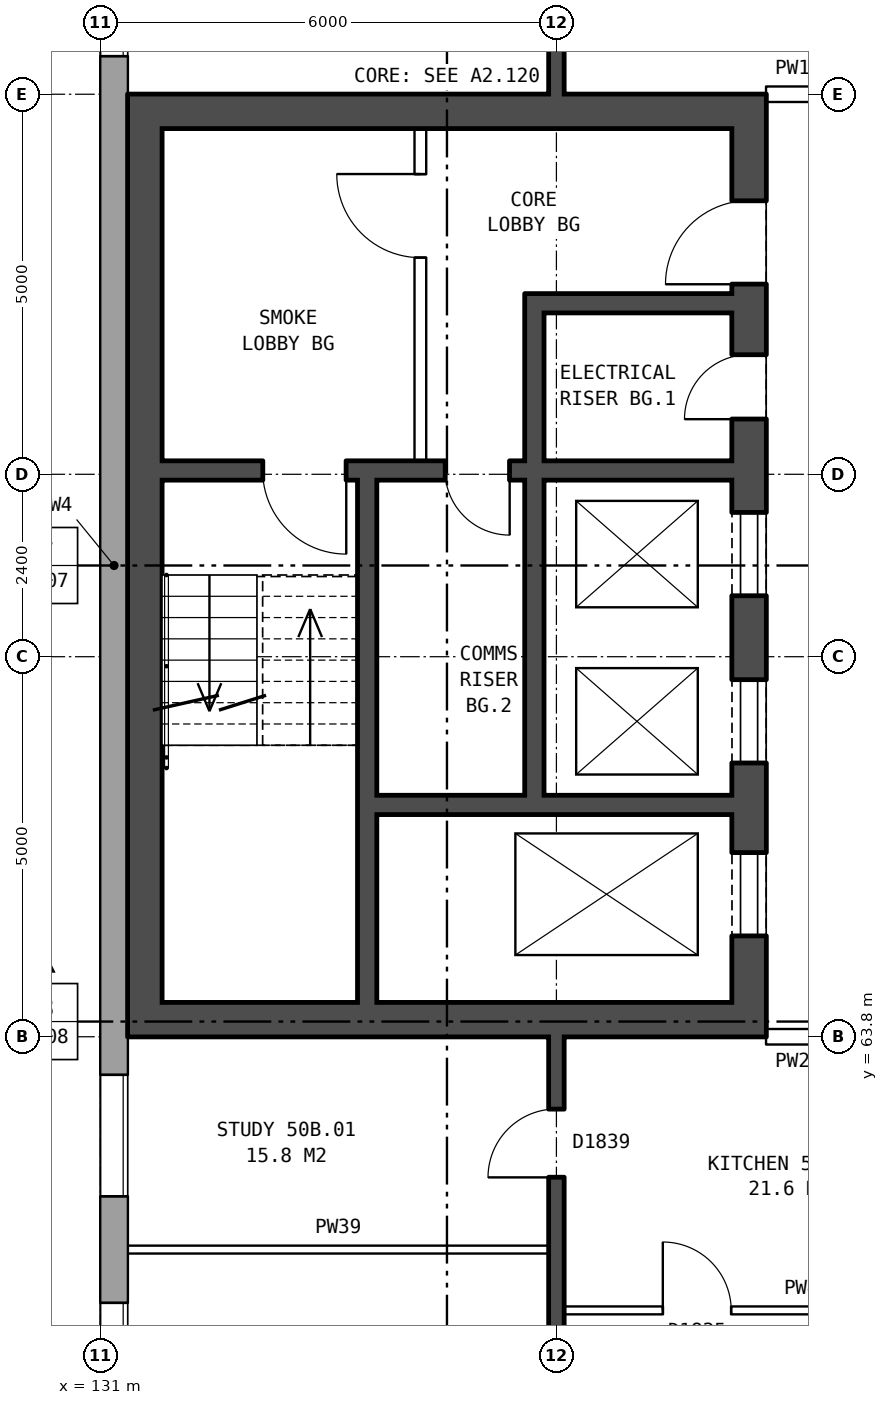
"""IFC4 building model, lengths in metres.
Left out: names, types, materials, properties, quantities, classifications, styles, units other than length and angle.
Written with IfcOpenShell. Run it as: python <this file> out.ifc"""

import sys

from ifc_helpers import new_model, si_unit, direction, frame, frame_2d, origin, place, context, subcontext, project, spatial, rectangle, extrude, element, fill, save


model = new_model("IFC4")
c1 = context("Model", 3, precision=1e-05, world=origin(), true_north=direction((0.0, 1.0)))
c2 = subcontext(c1, "Body", "Model", "MODEL_VIEW")
j1 = project(units=[si_unit("LENGTHUNIT", "METRE"), si_unit("PLANEANGLEUNIT", "RADIAN")], contexts=[c1])
p1 = place(None, origin())
s1 = spatial("IfcSite", under=j1, at=p1, CompositionType="ELEMENT")
p2 = place(p1, origin())
s2 = spatial("IfcBuilding", under=s1, at=p2, CompositionType="ELEMENT")
p3 = place(p2, frame((0.0, 0.0, 178.9)))
s3 = spatial("IfcBuildingStorey", under=s2, at=p3, CompositionType="ELEMENT", Elevation=178.9)
p4 = place(p3, frame((131.18, 82.925, 0.0), z_axis=(0.0, 0.0, 1.0), x_axis=(0.0, -1.0, 0.0)))
e1 = element("IfcWall", 1, at=p4, inside=s3, PredefinedType="STANDARD", context=c2, shape_type="SweptSolid", body=[
    extrude(rectangle(XDim=25.851, YDim=0.36, at=frame_2d((12.925, 0.0))), origin(), (0.0, 0.0, 1.0), 2.85),
])
p5 = place(p4, frame((1.625, 0.0, 0.8)))
e2 = element("IfcOpeningElement", 2, at=p5, cuts=e1, PredefinedType="OPENING", context=c2, shape_type="SweptSolid", body=[
    extrude(rectangle(XDim=1.6, YDim=1.8, at=frame_2d((0.8, 0.9))), frame((0.0, 0.19, 0.0), z_axis=(0.0, -1.0, 0.0), x_axis=(1.0, 0.0, 0.0)), (0.0, 0.0, 1.0), 0.38),
])
p6 = place(p4, frame((4.625, 0.0, 0.8)))
e3 = element("IfcOpeningElement", 3, at=p6, cuts=e1, PredefinedType="OPENING", context=c2, shape_type="SweptSolid", body=[
    extrude(rectangle(XDim=1.6, YDim=1.8, at=frame_2d((0.8, 0.9))), frame((0.0, 0.19, 0.0), z_axis=(0.0, -1.0, 0.0), x_axis=(1.0, 0.0, 0.0)), (0.0, 0.0, 1.0), 0.38),
])
p7 = place(p4, frame((19.625, 0.0, 0.8)))
e4 = element("IfcOpeningElement", 4, at=p7, cuts=e1, PredefinedType="OPENING", context=c2, shape_type="SweptSolid", body=[
    extrude(rectangle(XDim=1.6, YDim=1.8, at=frame_2d((0.8, 0.9))), frame((0.0, 0.19, 0.0), z_axis=(0.0, -1.0, 0.0), x_axis=(1.0, 0.0, 0.0)), (0.0, 0.0, 1.0), 0.38),
])
p8 = place(p4, frame((22.625, 0.0, 0.8)))
e5 = element("IfcOpeningElement", 5, at=p8, cuts=e1, PredefinedType="OPENING", context=c2, shape_type="SweptSolid", body=[
    extrude(rectangle(XDim=1.6, YDim=1.8, at=frame_2d((0.8, 0.9))), frame((0.0, 0.19, 0.0), z_axis=(0.0, -1.0, 0.0), x_axis=(1.0, 0.0, 0.0)), (0.0, 0.0, 1.0), 0.38),
])
p9 = place(p3, frame((139.535, 63.8, 0.0), z_axis=(0.0, 0.0, 1.0), x_axis=(0.0, 1.0, 0.0)))
e6 = element("IfcWall", 6, at=p9, inside=s3, PredefinedType="SHEAR", context=c2, shape_type="SweptSolid", body=[
    extrude(rectangle(XDim=12.4, YDim=0.45, at=frame_2d((6.2, 0.0))), origin(), (0.0, 0.0, 1.0), 2.85),
])
p10 = place(p9, frame((1.325, 0.0, 0.0)))
e7 = element("IfcOpeningElement", 7, at=p10, cuts=e6, PredefinedType="OPENING", context=c2, shape_type="SweptSolid", body=[
    extrude(rectangle(XDim=1.1, YDim=2.1, at=frame_2d((0.55, 1.05))), frame((0.0, 0.235, 0.0), z_axis=(0.0, -1.0, 0.0), x_axis=(1.0, 0.0, 0.0)), (0.0, 0.0, 1.0), 0.47),
])
p11 = place(p9, frame((3.6, 0.0, 0.0)))
e8 = element("IfcOpeningElement", 8, at=p11, cuts=e6, PredefinedType="OPENING", context=c2, shape_type="SweptSolid", body=[
    extrude(rectangle(XDim=1.1, YDim=2.1, at=frame_2d((0.55, 1.05))), frame((0.0, 0.235, 0.0), z_axis=(0.0, -1.0, 0.0), x_axis=(1.0, 0.0, 0.0)), (0.0, 0.0, 1.0), 0.47),
])
p12 = place(p9, frame((5.8, 0.0, 0.0)))
e9 = element("IfcOpeningElement", 9, at=p12, cuts=e6, PredefinedType="OPENING", context=c2, shape_type="SweptSolid", body=[
    extrude(rectangle(XDim=1.1, YDim=2.1, at=frame_2d((0.55, 1.05))), frame((0.0, 0.235, 0.0), z_axis=(0.0, -1.0, 0.0), x_axis=(1.0, 0.0, 0.0)), (0.0, 0.0, 1.0), 0.47),
])
p13 = place(p9, frame((9.9, 0.0, 0.0)))
e10 = element("IfcOpeningElement", 10, at=p13, cuts=e6, PredefinedType="OPENING", context=c2, shape_type="SweptSolid", body=[
    extrude(rectangle(XDim=1.1, YDim=2.1, at=frame_2d((0.55, 1.05))), frame((0.0, 0.235, 0.0), z_axis=(0.0, -1.0, 0.0), x_axis=(1.0, 0.0, 0.0)), (0.0, 0.0, 1.0), 0.47),
])
p14 = place(p9, frame((8.125, 0.0, 0.0)))
e11 = element("IfcOpeningElement", 11, at=p14, cuts=e6, PredefinedType="OPENING", context=c2, shape_type="SweptSolid", body=[
    extrude(rectangle(XDim=0.85, YDim=2.1, at=frame_2d((0.425, 1.05))), frame((0.0, 0.235, 0.0), z_axis=(0.0, -1.0, 0.0), x_axis=(1.0, 0.0, 0.0)), (0.0, 0.0, 1.0), 0.47),
])
p15 = place(p3, frame((131.585, 63.8, 0.0), z_axis=(0.0, 0.0, 1.0), x_axis=(0.0, 1.0, 0.0)))
e12 = element("IfcWall", 12, at=p15, inside=s3, PredefinedType="SHEAR", context=c2, shape_type="SweptSolid", body=[
    extrude(rectangle(XDim=12.4, YDim=0.45, at=frame_2d((6.2, 0.0))), origin(), (0.0, 0.0, 1.0), 2.85),
])
for number, where, z_axis, x_axis in (
    (13, (139.31, 64.025, 0.0), (0.0, 0.0, 1.0), (-1.0, 0.0, 0.0)),
    (14, (139.31, 75.975, 0.0), (0.0, 0.0, 1.0), (-1.0, 0.0, 0.0)),
):
    element("IfcWall", number, at=place(p3, frame(where, z_axis=z_axis, x_axis=x_axis)), inside=s3, PredefinedType="SHEAR", context=c2, shape_type="SweptSolid", body=[
        extrude(rectangle(XDim=7.5, YDim=0.45, at=frame_2d((3.75, 0.0))), origin(), (0.0, 0.0, 1.0), 2.85),
    ])
p16 = place(p3, frame((139.31, 66.85, 0.0), z_axis=(0.0, 0.0, 1.0), x_axis=(-1.0, 0.0, 0.0)))
e15 = element("IfcWall", 15, at=p16, inside=s3, PredefinedType="SHEAR", context=c2, shape_type="SweptSolid", body=[
    extrude(rectangle(XDim=4.675, YDim=0.25, at=frame_2d((2.337, 0.0))), origin(), (0.0, 0.0, 1.0), 2.85),
])
p17 = place(p3, frame((139.31, 71.25, 0.0), z_axis=(0.0, 0.0, 1.0), x_axis=(-1.0, 0.0, 0.0)))
e16 = element("IfcWall", 16, at=p17, inside=s3, PredefinedType="SHEAR", context=c2, shape_type="SweptSolid", body=[
    extrude(rectangle(XDim=7.5, YDim=0.25, at=frame_2d((3.75, 0.0))), origin(), (0.0, 0.0, 1.0), 2.85),
])
p18 = place(p17, frame((5.075, 0.0, 0.0)))
e17 = element("IfcOpeningElement", 17, at=p18, cuts=e16, PredefinedType="OPENING", context=c2, shape_type="SweptSolid", body=[
    extrude(rectangle(XDim=1.1, YDim=2.1, at=frame_2d((0.55, 1.05))), frame((0.0, 0.135, 0.0), z_axis=(0.0, -1.0, 0.0), x_axis=(1.0, 0.0, 0.0)), (0.0, 0.0, 1.0), 0.27),
])
p19 = place(p17, frame((2.925, 0.0, 0.0)))
e18 = element("IfcOpeningElement", 18, at=p19, cuts=e16, PredefinedType="OPENING", context=c2, shape_type="SweptSolid", body=[
    extrude(rectangle(XDim=0.85, YDim=2.1, at=frame_2d((0.425, 1.05))), frame((0.0, 0.135, 0.0), z_axis=(0.0, -1.0, 0.0), x_axis=(1.0, 0.0, 0.0)), (0.0, 0.0, 1.0), 0.27),
])
p20 = place(p3, frame((139.31, 73.45, 0.0), z_axis=(0.0, 0.0, 1.0), x_axis=(-1.0, 0.0, 0.0)))
e19 = element("IfcWall", 19, at=p20, inside=s3, PredefinedType="SHEAR", context=c2, shape_type="SweptSolid", body=[
    extrude(rectangle(XDim=2.475, YDim=0.25, at=frame_2d((1.238, 0.0))), origin(), (0.0, 0.0, 1.0), 2.85),
])
p21 = place(p3, frame((136.71, 66.975, 0.0), z_axis=(0.0, 0.0, 1.0), x_axis=(0.0, 1.0, 0.0)))
e20 = element("IfcWall", 20, at=p21, inside=s3, PredefinedType="SHEAR", context=c2, shape_type="SweptSolid", body=[
    extrude(rectangle(XDim=4.15, YDim=0.25, at=frame_2d((2.075, 0.0))), origin(), (0.0, 0.0, 1.0), 2.85),
])
p22 = place(p3, frame((136.71, 71.375, 0.0), z_axis=(0.0, 0.0, 1.0), x_axis=(0.0, 1.0, 0.0)))
e21 = element("IfcWall", 21, at=p22, inside=s3, PredefinedType="SHEAR", context=c2, shape_type="SweptSolid", body=[
    extrude(rectangle(XDim=2.2, YDim=0.25, at=frame_2d((1.1, 0.0))), origin(), (0.0, 0.0, 1.0), 2.85),
])
p23 = place(p3, frame((135.21, 71.375, 0.0), z_axis=(0.0, 0.0, 1.0), x_axis=(0.0, 1.0, 0.0)))
e22 = element("IfcWall", 22, at=p23, inside=s3, PredefinedType="PARTITIONING", context=c2, shape_type="SweptSolid", body=[
    extrude(rectangle(XDim=4.375, YDim=0.15, at=frame_2d((2.188, 0.0))), origin(), (0.0, 0.0, 1.0), 2.85),
])
p24 = place(p23, frame((2.675, 0.0, 0.0)))
e23 = element("IfcOpeningElement", 23, at=p24, cuts=e22, PredefinedType="OPENING", context=c2, shape_type="SweptSolid", body=[
    extrude(rectangle(XDim=1.1, YDim=2.1, at=frame_2d((0.55, 1.05))), frame((0.0, 0.085, 0.0), z_axis=(0.0, -1.0, 0.0), x_axis=(1.0, 0.0, 0.0)), (0.0, 0.0, 1.0), 0.17),
])
p25 = place(p3, frame((134.51, 64.25, 0.0), z_axis=(0.0, 0.0, 1.0), x_axis=(0.0, 1.0, 0.0)))
e24 = element("IfcWall", 24, at=p25, inside=s3, PredefinedType="SHEAR", context=c2, shape_type="SweptSolid", body=[
    extrude(rectangle(XDim=6.875, YDim=0.25, at=frame_2d((3.438, 0.0))), origin(), (0.0, 0.0, 1.0), 2.85),
])
p26 = place(p3, frame((137.1, 60.2, 0.0), z_axis=(0.0, 0.0, 1.0), x_axis=(1.0, 0.0, 0.0)))
e25 = element("IfcWall", 25, at=p26, inside=s3, PredefinedType="PARTITIONING", context=c2, shape_type="SweptSolid", body=[
    extrude(rectangle(XDim=5.8, YDim=0.1, at=frame_2d((2.9, 0.0))), origin(), (0.0, 0.0, 1.0), 2.85),
])
p27 = place(p26, frame((1.3, 0.0, 0.0)))
e26 = element("IfcOpeningElement", 26, at=p27, cuts=e25, PredefinedType="OPENING", context=c2, shape_type="SweptSolid", body=[
    extrude(rectangle(XDim=0.9, YDim=2.1, at=frame_2d((0.45, 1.05))), frame((0.0, 0.06, 0.0), z_axis=(0.0, -1.0, 0.0), x_axis=(1.0, 0.0, 0.0)), (0.0, 0.0, 1.0), 0.12),
])
p28 = place(p26, frame((4.2, 0.0, 0.0)))
e27 = element("IfcOpeningElement", 27, at=p28, cuts=e25, PredefinedType="OPENING", context=c2, shape_type="SweptSolid", body=[
    extrude(rectangle(XDim=0.9, YDim=2.1, at=frame_2d((0.45, 1.05))), frame((0.0, 0.06, 0.0), z_axis=(0.0, -1.0, 0.0), x_axis=(1.0, 0.0, 0.0)), (0.0, 0.0, 1.0), 0.12),
])
p29 = place(p3, frame((131.36, 61.0, 0.0), z_axis=(0.0, 0.0, 1.0), x_axis=(1.0, 0.0, 0.0)))
e28 = element("IfcWall", 28, at=p29, inside=s3, PredefinedType="PARTITIONING", context=c2, shape_type="SweptSolid", body=[
    extrude(rectangle(XDim=5.54, YDim=0.1, at=frame_2d((2.77, 0.0))), origin(), (0.0, 0.0, 1.0), 2.85),
])
p30 = place(p3, frame((139.76, 63.8, 0.0), z_axis=(0.0, 0.0, 1.0), x_axis=(1.0, 0.0, 0.0)))
e29 = element("IfcWall", 29, at=p30, inside=s3, PredefinedType="PARTITIONING", context=c2, shape_type="SweptSolid", body=[
    extrude(rectangle(XDim=3.0, YDim=0.2, at=frame_2d((1.5, 0.0))), origin(), (0.0, 0.0, 1.0), 2.85),
])
p31 = place(p30, frame((1.0, 0.0, 0.0)))
e30 = element("IfcOpeningElement", 30, at=p31, cuts=e29, PredefinedType="OPENING", context=c2, shape_type="SweptSolid", body=[
    extrude(rectangle(XDim=1.0, YDim=2.1, at=frame_2d((0.5, 1.05))), frame((0.0, 0.11, 0.0), z_axis=(0.0, -1.0, 0.0), x_axis=(1.0, 0.0, 0.0)), (0.0, 0.0, 1.0), 0.22),
])
p32 = place(p3, frame((139.76, 76.2, 0.0), z_axis=(0.0, 0.0, 1.0), x_axis=(1.0, 0.0, 0.0)))
e31 = element("IfcWall", 31, at=p32, inside=s3, PredefinedType="PARTITIONING", context=c2, shape_type="SweptSolid", body=[
    extrude(rectangle(XDim=3.0, YDim=0.2, at=frame_2d((1.5, 0.0))), origin(), (0.0, 0.0, 1.0), 2.85),
])
p33 = place(p32, frame((1.0, 0.0, 0.0)))
e32 = element("IfcOpeningElement", 32, at=p33, cuts=e31, PredefinedType="OPENING", context=c2, shape_type="SweptSolid", body=[
    extrude(rectangle(XDim=1.0, YDim=2.1, at=frame_2d((0.5, 1.05))), frame((0.0, 0.11, 0.0), z_axis=(0.0, -1.0, 0.0), x_axis=(1.0, 0.0, 0.0)), (0.0, 0.0, 1.0), 0.22),
])
p34 = place(p3, frame((137.0, 54.36, 0.0), z_axis=(0.0, 0.0, 1.0), x_axis=(0.0, 1.0, 0.0)))
e33 = element("IfcWall", 33, at=p34, inside=s3, PredefinedType="SOLIDWALL", context=c2, shape_type="SweptSolid", body=[
    extrude(rectangle(XDim=9.44, YDim=0.2, at=frame_2d((4.72, 0.0))), origin(), (0.0, 0.0, 1.0), 2.85),
])
p35 = place(p34, frame((2.47, 0.0, 0.0)))
e34 = element("IfcOpeningElement", 34, at=p35, cuts=e33, PredefinedType="OPENING", context=c2, shape_type="SweptSolid", body=[
    extrude(rectangle(XDim=0.9, YDim=2.1, at=frame_2d((0.45, 1.05))), frame((0.0, 0.11, 0.0), z_axis=(0.0, -1.0, 0.0), x_axis=(1.0, 0.0, 0.0)), (0.0, 0.0, 1.0), 0.22),
])
p36 = place(p34, frame((7.59, 0.0, 0.0)))
e35 = element("IfcOpeningElement", 35, at=p36, cuts=e33, PredefinedType="OPENING", context=c2, shape_type="SweptSolid", body=[
    extrude(rectangle(XDim=0.9, YDim=2.1, at=frame_2d((0.45, 1.05))), frame((0.0, 0.11, 0.0), z_axis=(0.0, -1.0, 0.0), x_axis=(1.0, 0.0, 0.0)), (0.0, 0.0, 1.0), 0.22),
])
p37 = place(p3, frame((137.0, 76.2, 0.0), z_axis=(0.0, 0.0, 1.0), x_axis=(0.0, 1.0, 0.0)))
e36 = element("IfcWall", 36, at=p37, inside=s3, PredefinedType="SOLIDWALL", context=c2, shape_type="SweptSolid", body=[
    extrude(rectangle(XDim=9.44, YDim=0.2, at=frame_2d((4.72, 0.0))), origin(), (0.0, 0.0, 1.0), 2.85),
])
p38 = place(p37, frame((1.5, 0.0, 0.0)))
e37 = element("IfcOpeningElement", 37, at=p38, cuts=e36, PredefinedType="OPENING", context=c2, shape_type="SweptSolid", body=[
    extrude(rectangle(XDim=0.9, YDim=2.1, at=frame_2d((0.45, 1.05))), frame((0.0, 0.11, 0.0), z_axis=(0.0, -1.0, 0.0), x_axis=(1.0, 0.0, 0.0)), (0.0, 0.0, 1.0), 0.22),
])
p39 = place(p6, origin())
e38 = element("IfcWindow", 38, at=p39, inside=s3, PartitioningType="SINGLE_PANEL", PredefinedType="WINDOW", context=c2, shape_type="SweptSolid", body=[
    extrude(rectangle(XDim=1.6, YDim=1.8, at=frame_2d((0.8, 0.9))), frame((0.0, 0.15, 0.0), z_axis=(0.0, -1.0, 0.0), x_axis=(1.0, 0.0, 0.0)), (0.0, 0.0, 1.0), 0.06),
])
fill(e3, e38)
p40 = place(p7, origin())
e39 = element("IfcWindow", 39, at=p40, inside=s3, PartitioningType="SINGLE_PANEL", PredefinedType="WINDOW", context=c2, shape_type="SweptSolid", body=[
    extrude(rectangle(XDim=1.6, YDim=1.8, at=frame_2d((0.8, 0.9))), frame((0.0, 0.15, 0.0), z_axis=(0.0, -1.0, 0.0), x_axis=(1.0, 0.0, 0.0)), (0.0, 0.0, 1.0), 0.06),
])
fill(e4, e39)
p41 = place(p8, origin())
e40 = element("IfcWindow", 40, at=p41, inside=s3, PartitioningType="SINGLE_PANEL", PredefinedType="WINDOW", context=c2, shape_type="SweptSolid", body=[
    extrude(rectangle(XDim=1.6, YDim=1.8, at=frame_2d((0.8, 0.9))), frame((0.0, 0.15, 0.0), z_axis=(0.0, -1.0, 0.0), x_axis=(1.0, 0.0, 0.0)), (0.0, 0.0, 1.0), 0.06),
])
fill(e5, e40)
p42 = place(p10, origin())
e41 = element("IfcDoor", 41, at=p42, inside=s3, OperationType="DOUBLE_DOOR_SLIDING", PredefinedType="DOOR", context=c2, shape_type="SweptSolid", body=[
    extrude(rectangle(XDim=1.1, YDim=2.1, at=frame_2d((0.55, 1.05))), frame((0.0, 0.21, 0.0), z_axis=(0.0, -1.0, 0.0), x_axis=(1.0, 0.0, 0.0)), (0.0, 0.0, 1.0), 0.05),
])
fill(e7, e41)
p43 = place(p11, origin())
e42 = element("IfcDoor", 42, at=p43, inside=s3, OperationType="DOUBLE_DOOR_SLIDING", PredefinedType="DOOR", context=c2, shape_type="SweptSolid", body=[
    extrude(rectangle(XDim=1.1, YDim=2.1, at=frame_2d((0.55, 1.05))), frame((0.0, 0.21, 0.0), z_axis=(0.0, -1.0, 0.0), x_axis=(1.0, 0.0, 0.0)), (0.0, 0.0, 1.0), 0.05),
])
fill(e8, e42)
p44 = place(p12, origin())
e43 = element("IfcDoor", 43, at=p44, inside=s3, OperationType="DOUBLE_DOOR_SLIDING", PredefinedType="DOOR", context=c2, shape_type="SweptSolid", body=[
    extrude(rectangle(XDim=1.1, YDim=2.1, at=frame_2d((0.55, 1.05))), frame((0.0, 0.21, 0.0), z_axis=(0.0, -1.0, 0.0), x_axis=(1.0, 0.0, 0.0)), (0.0, 0.0, 1.0), 0.05),
])
fill(e9, e43)
p45 = place(p13, origin())
e44 = element("IfcDoor", 44, at=p45, inside=s3, OperationType="SINGLE_SWING_LEFT", PredefinedType="DOOR", context=c2, shape_type="SweptSolid", body=[
    extrude(rectangle(XDim=1.1, YDim=2.1, at=frame_2d((0.55, 1.05))), frame((0.0, 0.21, 0.0), z_axis=(0.0, -1.0, 0.0), x_axis=(1.0, 0.0, 0.0)), (0.0, 0.0, 1.0), 0.05),
])
fill(e10, e44)
p46 = place(p24, origin())
e45 = element("IfcDoor", 45, at=p46, inside=s3, OperationType="SINGLE_SWING_RIGHT", PredefinedType="DOOR", context=c2, shape_type="SweptSolid", body=[
    extrude(rectangle(XDim=1.1, YDim=2.1, at=frame_2d((0.55, 1.05))), frame((0.0, 0.025, 0.0), z_axis=(0.0, -1.0, 0.0), x_axis=(1.0, 0.0, 0.0)), (0.0, 0.0, 1.0), 0.05),
])
fill(e23, e45)
p47 = place(p18, origin())
e46 = element("IfcDoor", 46, at=p47, inside=s3, OperationType="SINGLE_SWING_LEFT", PredefinedType="DOOR", context=c2, shape_type="SweptSolid", body=[
    extrude(rectangle(XDim=1.1, YDim=2.1, at=frame_2d((0.55, 1.05))), frame((0.0, 0.025, 0.0), z_axis=(0.0, -1.0, 0.0), x_axis=(1.0, 0.0, 0.0)), (0.0, 0.0, 1.0), 0.05),
])
fill(e17, e46)
p48 = place(p14, origin())
e47 = element("IfcDoor", 47, at=p48, inside=s3, OperationType="SINGLE_SWING_LEFT", PredefinedType="DOOR", context=c2, shape_type="SweptSolid", body=[
    extrude(rectangle(XDim=0.85, YDim=2.1, at=frame_2d((0.425, 1.05))), frame((0.0, 0.21, 0.0), z_axis=(0.0, -1.0, 0.0), x_axis=(1.0, 0.0, 0.0)), (0.0, 0.0, 1.0), 0.05),
])
fill(e11, e47)
p49 = place(p19, origin())
e48 = element("IfcDoor", 48, at=p49, inside=s3, OperationType="SINGLE_SWING_LEFT", PredefinedType="DOOR", context=c2, shape_type="SweptSolid", body=[
    extrude(rectangle(XDim=0.85, YDim=2.1, at=frame_2d((0.425, 1.05))), frame((0.0, 0.025, 0.0), z_axis=(0.0, -1.0, 0.0), x_axis=(1.0, 0.0, 0.0)), (0.0, 0.0, 1.0), 0.05),
])
fill(e18, e48)
p50 = place(p36, origin())
e49 = element("IfcDoor", 49, at=p50, inside=s3, OperationType="SINGLE_SWING_LEFT", PredefinedType="DOOR", context=c2, shape_type="SweptSolid", body=[
    extrude(rectangle(XDim=0.9, YDim=2.1, at=frame_2d((0.45, 1.05))), frame((0.0, 0.025, 0.0), z_axis=(0.0, -1.0, 0.0), x_axis=(1.0, 0.0, 0.0)), (0.0, 0.0, 1.0), 0.05),
])
fill(e35, e49)
p51 = place(p27, origin())
e50 = element("IfcDoor", 50, at=p51, inside=s3, OperationType="SINGLE_SWING_LEFT", PredefinedType="DOOR", context=c2, shape_type="SweptSolid", body=[
    extrude(rectangle(XDim=0.9, YDim=2.1, at=frame_2d((0.45, 1.05))), frame((0.0, 0.025, 0.0), z_axis=(0.0, -1.0, 0.0), x_axis=(1.0, 0.0, 0.0)), (0.0, 0.0, 1.0), 0.05),
])
fill(e26, e50)
save(model, sys.argv[1])
